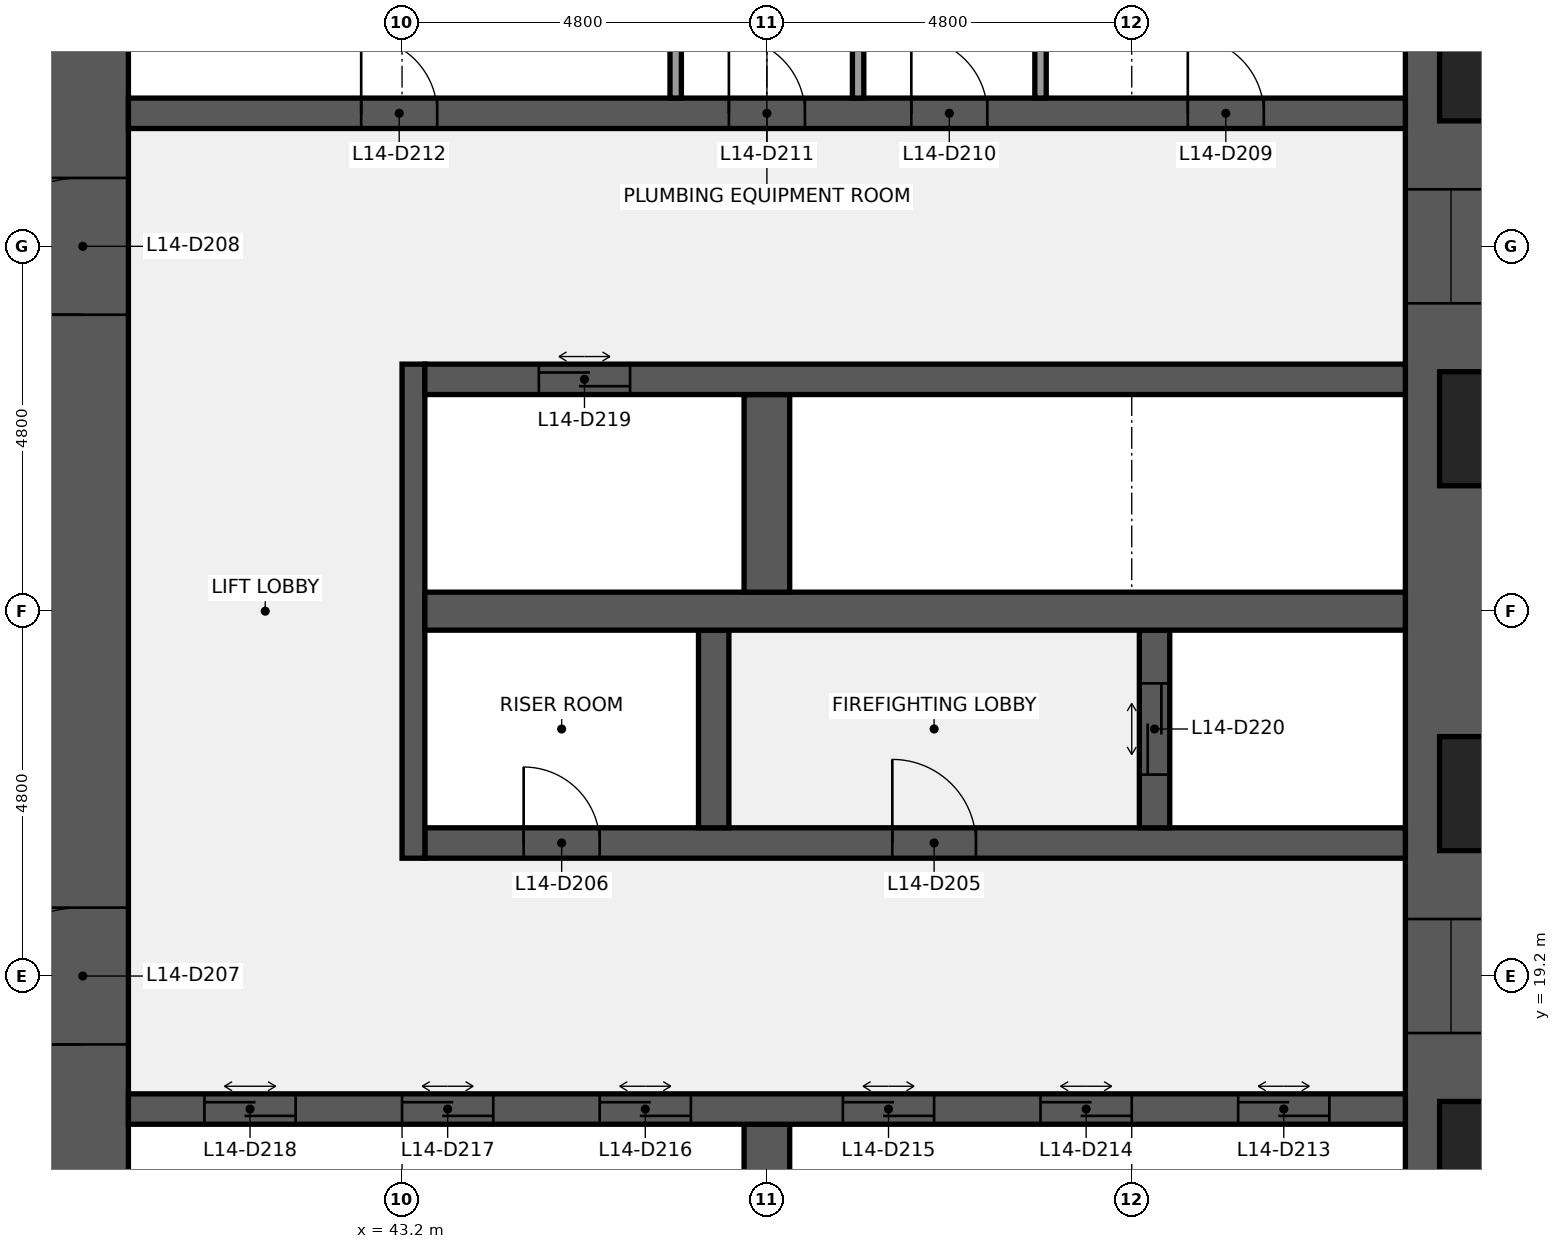
"""IFC4 building model, lengths in metres.
Left out: names, types, materials, properties, quantities, classifications, styles, units other than length and angle.
Written with IfcOpenShell. Run it as: python <this file> out.ifc"""

import sys

from ifc_helpers import new_model, si_unit, direction, frame, frame_2d, origin, place, context, subcontext, project, spatial, rectangle, extrude, element, fill, save


model = new_model("IFC4")
c1 = context("Model", 3, precision=1e-05, world=origin(), true_north=direction((0.0, 1.0)))
c2 = subcontext(c1, "Body", "Model", "MODEL_VIEW")
j1 = project(units=[si_unit("LENGTHUNIT", "METRE"), si_unit("PLANEANGLEUNIT", "RADIAN")], contexts=[c1])
p1 = place(None, origin())
s1 = spatial("IfcSite", under=j1, at=p1, CompositionType="ELEMENT")
p2 = place(p1, origin())
s2 = spatial("IfcBuilding", under=s1, at=p2, CompositionType="ELEMENT")
p3 = place(p2, frame((0.0, 0.0, 67.0)))
s3 = spatial("IfcBuildingStorey", under=s2, at=p3, CompositionType="ELEMENT", Elevation=67.0)
p4 = place(p3, frame((57.0, 38.4, 0.0), z_axis=(0.0, 0.0, 1.0), x_axis=(0.0, -1.0, 0.0)))
e1 = element("IfcWall", 1, at=p4, inside=s3, PredefinedType="SHEAR", context=c2, shape_type="SweptSolid", body=[
    extrude(rectangle(XDim=28.8, YDim=1.2, at=frame_2d((14.4, 0.0))), origin(), (0.0, 0.0, 1.0), 3.84),
])
p5 = place(p4, frame((18.45, 0.0, 0.9)))
e2 = element("IfcOpeningElement", 2, at=p5, cuts=e1, PredefinedType="OPENING", context=c2, shape_type="SweptSolid", body=[
    extrude(rectangle(XDim=1.5, YDim=1.5, at=frame_2d((0.75, 0.75))), frame((0.0, 0.61, 0.0), z_axis=(0.0, -1.0, 0.0), x_axis=(1.0, 0.0, 0.0)), (0.0, 0.0, 1.0), 1.22),
])
p6 = place(p4, frame((8.85, 0.0, 0.9)))
e3 = element("IfcOpeningElement", 3, at=p6, cuts=e1, PredefinedType="OPENING", context=c2, shape_type="SweptSolid", body=[
    extrude(rectangle(XDim=1.5, YDim=1.5, at=frame_2d((0.75, 0.75))), frame((0.0, 0.61, 0.0), z_axis=(0.0, -1.0, 0.0), x_axis=(1.0, 0.0, 0.0)), (0.0, 0.0, 1.0), 1.22),
])
p7 = place(p3, frame((39.0, 9.6, 0.0), z_axis=(0.0, 0.0, 1.0), x_axis=(0.0, 1.0, 0.0)))
e4 = element("IfcWall", 4, at=p7, inside=s3, PredefinedType="SHEAR", context=c2, shape_type="SweptSolid", body=[
    extrude(rectangle(XDim=28.8, YDim=1.2, at=frame_2d((14.4, 0.0))), origin(), (0.0, 0.0, 1.0), 3.84),
])
p8 = place(p7, frame((8.7, 0.0, 0.0)))
e5 = element("IfcOpeningElement", 5, at=p8, cuts=e4, PredefinedType="OPENING", context=c2, shape_type="SweptSolid", body=[
    extrude(rectangle(XDim=1.8, YDim=2.1, at=frame_2d((0.9, 1.05))), frame((0.0, 0.61, 0.0), z_axis=(0.0, -1.0, 0.0), x_axis=(1.0, 0.0, 0.0)), (0.0, 0.0, 1.0), 1.22),
])
p9 = place(p7, frame((18.3, 0.0, 0.0)))
e6 = element("IfcOpeningElement", 6, at=p9, cuts=e4, PredefinedType="OPENING", context=c2, shape_type="SweptSolid", body=[
    extrude(rectangle(XDim=1.8, YDim=2.1, at=frame_2d((0.9, 1.05))), frame((0.0, 0.61, 0.0), z_axis=(0.0, -1.0, 0.0), x_axis=(1.0, 0.0, 0.0)), (0.0, 0.0, 1.0), 1.22),
])
p10 = place(p3, frame((48.0, 14.65, 0.0), z_axis=(0.0, 0.0, 1.0), x_axis=(0.0, 1.0, 0.0)))
e7 = element("IfcWall", 7, at=p10, inside=s3, PredefinedType="SHEAR", context=c2, shape_type="SweptSolid", body=[
    extrude(rectangle(XDim=2.6, YDim=0.6, at=frame_2d((1.3, 0.0))), origin(), (0.0, 0.0, 1.0), 3.84),
])
p11 = place(p3, frame((39.6, 17.45, 0.0), z_axis=(0.0, 0.0, 1.0), x_axis=(1.0, 0.0, 0.0)))
e8 = element("IfcWall", 8, at=p11, inside=s3, PredefinedType="SHEAR", context=c2, shape_type="SweptSolid", body=[
    extrude(rectangle(XDim=16.8, YDim=0.4, at=frame_2d((8.4, 0.0))), origin(), (0.0, 0.0, 1.0), 3.84),
])
p12 = place(p11, frame((14.6, 0.0, 0.0)))
e9 = element("IfcOpeningElement", 9, at=p12, cuts=e8, PredefinedType="OPENING", context=c2, shape_type="SweptSolid", body=[
    extrude(rectangle(XDim=1.2, YDim=2.1, at=frame_2d((0.6, 1.05))), frame((0.0, 0.21, 0.0), z_axis=(0.0, -1.0, 0.0), x_axis=(1.0, 0.0, 0.0)), (0.0, 0.0, 1.0), 0.42),
])
p13 = place(p11, frame((12.0, 0.0, 0.0)))
e10 = element("IfcOpeningElement", 10, at=p13, cuts=e8, PredefinedType="OPENING", context=c2, shape_type="SweptSolid", body=[
    extrude(rectangle(XDim=1.2, YDim=2.1, at=frame_2d((0.6, 1.05))), frame((0.0, 0.21, 0.0), z_axis=(0.0, -1.0, 0.0), x_axis=(1.0, 0.0, 0.0)), (0.0, 0.0, 1.0), 0.42),
])
p14 = place(p11, frame((9.4, 0.0, 0.0)))
e11 = element("IfcOpeningElement", 11, at=p14, cuts=e8, PredefinedType="OPENING", context=c2, shape_type="SweptSolid", body=[
    extrude(rectangle(XDim=1.2, YDim=2.1, at=frame_2d((0.6, 1.05))), frame((0.0, 0.21, 0.0), z_axis=(0.0, -1.0, 0.0), x_axis=(1.0, 0.0, 0.0)), (0.0, 0.0, 1.0), 0.42),
])
p15 = place(p11, frame((6.2, 0.0, 0.0)))
e12 = element("IfcOpeningElement", 12, at=p15, cuts=e8, PredefinedType="OPENING", context=c2, shape_type="SweptSolid", body=[
    extrude(rectangle(XDim=1.2, YDim=2.1, at=frame_2d((0.6, 1.05))), frame((0.0, 0.21, 0.0), z_axis=(0.0, -1.0, 0.0), x_axis=(1.0, 0.0, 0.0)), (0.0, 0.0, 1.0), 0.42),
])
p16 = place(p11, frame((3.6, 0.0, 0.0)))
e13 = element("IfcOpeningElement", 13, at=p16, cuts=e8, PredefinedType="OPENING", context=c2, shape_type="SweptSolid", body=[
    extrude(rectangle(XDim=1.2, YDim=2.1, at=frame_2d((0.6, 1.05))), frame((0.0, 0.21, 0.0), z_axis=(0.0, -1.0, 0.0), x_axis=(1.0, 0.0, 0.0)), (0.0, 0.0, 1.0), 0.42),
])
p17 = place(p11, frame((1.0, 0.0, 0.0)))
e14 = element("IfcOpeningElement", 14, at=p17, cuts=e8, PredefinedType="OPENING", context=c2, shape_type="SweptSolid", body=[
    extrude(rectangle(XDim=1.2, YDim=2.1, at=frame_2d((0.6, 1.05))), frame((0.0, 0.21, 0.0), z_axis=(0.0, -1.0, 0.0), x_axis=(1.0, 0.0, 0.0)), (0.0, 0.0, 1.0), 0.42),
])
p18 = place(p3, frame((43.5, 20.95, 0.0), z_axis=(0.0, 0.0, 1.0), x_axis=(1.0, 0.0, 0.0)))
e15 = element("IfcWall", 15, at=p18, inside=s3, PredefinedType="SHEAR", context=c2, shape_type="SweptSolid", body=[
    extrude(rectangle(XDim=12.9, YDim=0.4, at=frame_2d((6.45, 0.0))), origin(), (0.0, 0.0, 1.0), 3.84),
])
p19 = place(p18, frame((6.15, 0.0, 0.0)))
e16 = element("IfcOpeningElement", 16, at=p19, cuts=e15, PredefinedType="OPENING", context=c2, shape_type="SweptSolid", body=[
    extrude(rectangle(XDim=1.1, YDim=2.1, at=frame_2d((0.55, 1.05))), frame((0.0, 0.21, 0.0), z_axis=(0.0, -1.0, 0.0), x_axis=(1.0, 0.0, 0.0)), (0.0, 0.0, 1.0), 0.42),
])
p20 = place(p18, frame((1.3, 0.0, 0.0)))
e17 = element("IfcOpeningElement", 17, at=p20, cuts=e15, PredefinedType="OPENING", context=c2, shape_type="SweptSolid", body=[
    extrude(rectangle(XDim=1.0, YDim=2.1, at=frame_2d((0.5, 1.05))), frame((0.0, 0.21, 0.0), z_axis=(0.0, -1.0, 0.0), x_axis=(1.0, 0.0, 0.0)), (0.0, 0.0, 1.0), 0.42),
])
p21 = place(p3, frame((43.35, 20.75, 0.0), z_axis=(0.0, 0.0, 1.0), x_axis=(0.0, 1.0, 0.0)))
e18 = element("IfcWall", 18, at=p21, inside=s3, PredefinedType="SHEAR", context=c2, shape_type="SweptSolid", body=[
    extrude(rectangle(XDim=6.5, YDim=0.3, at=frame_2d((3.25, 0.0))), origin(), (0.0, 0.0, 1.0), 3.84),
])
p22 = place(p3, frame((53.1, 21.15, 0.0), z_axis=(0.0, 0.0, 1.0), x_axis=(0.0, 1.0, 0.0)))
e19 = element("IfcWall", 19, at=p22, inside=s3, PredefinedType="SHEAR", context=c2, shape_type="SweptSolid", body=[
    extrude(rectangle(XDim=2.6, YDim=0.4, at=frame_2d((1.3, 0.0))), origin(), (0.0, 0.0, 1.0), 3.84),
])
p23 = place(p22, frame((0.7, 0.0, 0.0)))
e20 = element("IfcOpeningElement", 20, at=p23, cuts=e19, PredefinedType="OPENING", context=c2, shape_type="SweptSolid", body=[
    extrude(rectangle(XDim=1.2, YDim=2.1, at=frame_2d((0.6, 1.05))), frame((0.0, 0.21, 0.0), z_axis=(0.0, -1.0, 0.0), x_axis=(1.0, 0.0, 0.0)), (0.0, 0.0, 1.0), 0.42),
])
p24 = place(p3, frame((47.3, 21.15, 0.0), z_axis=(0.0, 0.0, 1.0), x_axis=(0.0, 1.0, 0.0)))
e21 = element("IfcWall", 21, at=p24, inside=s3, PredefinedType="SHEAR", context=c2, shape_type="SweptSolid", body=[
    extrude(rectangle(XDim=2.6, YDim=0.4, at=frame_2d((1.3, 0.0))), origin(), (0.0, 0.0, 1.0), 3.84),
])
p25 = place(p3, frame((43.5, 24.0, 0.0), z_axis=(0.0, 0.0, 1.0), x_axis=(1.0, 0.0, 0.0)))
e22 = element("IfcWall", 22, at=p25, inside=s3, PredefinedType="SHEAR", context=c2, shape_type="SweptSolid", body=[
    extrude(rectangle(XDim=12.9, YDim=0.5, at=frame_2d((6.45, 0.0))), origin(), (0.0, 0.0, 1.0), 3.84),
])
p26 = place(p3, frame((48.0, 24.25, 0.0), z_axis=(0.0, 0.0, 1.0), x_axis=(0.0, 1.0, 0.0)))
e23 = element("IfcWall", 23, at=p26, inside=s3, PredefinedType="SHEAR", context=c2, shape_type="SweptSolid", body=[
    extrude(rectangle(XDim=2.6, YDim=0.6, at=frame_2d((1.3, 0.0))), origin(), (0.0, 0.0, 1.0), 3.84),
])
p27 = place(p3, frame((43.5, 27.05, 0.0), z_axis=(0.0, 0.0, 1.0), x_axis=(1.0, 0.0, 0.0)))
e24 = element("IfcWall", 24, at=p27, inside=s3, PredefinedType="SHEAR", context=c2, shape_type="SweptSolid", body=[
    extrude(rectangle(XDim=12.9, YDim=0.4, at=frame_2d((6.45, 0.0))), origin(), (0.0, 0.0, 1.0), 3.84),
])
p28 = place(p27, frame((1.5, 0.0, 0.0)))
e25 = element("IfcOpeningElement", 25, at=p28, cuts=e24, PredefinedType="OPENING", context=c2, shape_type="SweptSolid", body=[
    extrude(rectangle(XDim=1.2, YDim=2.1, at=frame_2d((0.6, 1.05))), frame((0.0, 0.21, 0.0), z_axis=(0.0, -1.0, 0.0), x_axis=(1.0, 0.0, 0.0)), (0.0, 0.0, 1.0), 0.42),
])
p29 = place(p3, frame((39.6, 30.55, 0.0), z_axis=(0.0, 0.0, 1.0), x_axis=(1.0, 0.0, 0.0)))
e26 = element("IfcWall", 26, at=p29, inside=s3, PredefinedType="SHEAR", context=c2, shape_type="SweptSolid", body=[
    extrude(rectangle(XDim=16.8, YDim=0.4, at=frame_2d((8.4, 0.0))), origin(), (0.0, 0.0, 1.0), 3.84),
])
p30 = place(p29, frame((13.938, 0.0, 0.0)))
e27 = element("IfcOpeningElement", 27, at=p30, cuts=e26, PredefinedType="OPENING", context=c2, shape_type="SweptSolid", body=[
    extrude(rectangle(XDim=1.0, YDim=2.1, at=frame_2d((0.5, 1.05))), frame((0.0, 0.21, 0.0), z_axis=(0.0, -1.0, 0.0), x_axis=(1.0, 0.0, 0.0)), (0.0, 0.0, 1.0), 0.42),
])
p31 = place(p29, frame((10.3, 0.0, 0.0)))
e28 = element("IfcOpeningElement", 28, at=p31, cuts=e26, PredefinedType="OPENING", context=c2, shape_type="SweptSolid", body=[
    extrude(rectangle(XDim=1.0, YDim=2.1, at=frame_2d((0.5, 1.05))), frame((0.0, 0.21, 0.0), z_axis=(0.0, -1.0, 0.0), x_axis=(1.0, 0.0, 0.0)), (0.0, 0.0, 1.0), 0.42),
])
p32 = place(p29, frame((7.9, 0.0, 0.0)))
e29 = element("IfcOpeningElement", 29, at=p32, cuts=e26, PredefinedType="OPENING", context=c2, shape_type="SweptSolid", body=[
    extrude(rectangle(XDim=1.0, YDim=2.1, at=frame_2d((0.5, 1.05))), frame((0.0, 0.21, 0.0), z_axis=(0.0, -1.0, 0.0), x_axis=(1.0, 0.0, 0.0)), (0.0, 0.0, 1.0), 0.42),
])
p33 = place(p29, frame((3.062, 0.0, 0.0)))
e30 = element("IfcOpeningElement", 30, at=p33, cuts=e26, PredefinedType="OPENING", context=c2, shape_type="SweptSolid", body=[
    extrude(rectangle(XDim=1.0, YDim=2.1, at=frame_2d((0.5, 1.05))), frame((0.0, 0.21, 0.0), z_axis=(0.0, -1.0, 0.0), x_axis=(1.0, 0.0, 0.0)), (0.0, 0.0, 1.0), 0.42),
])
for number, where, z_axis, x_axis in (
    (31, (51.6, 30.75, 0.0), (0.0, 0.0, 1.0), (0.0, 1.0, 0.0)),
    (32, (49.2, 30.75, 0.0), (0.0, 0.0, 1.0), (0.0, 1.0, 0.0)),
    (33, (46.8, 30.75, 0.0), (0.0, 0.0, 1.0), (0.0, 1.0, 0.0)),
):
    element("IfcWall", number, at=place(p3, frame(where, z_axis=z_axis, x_axis=x_axis)), inside=s3, PredefinedType="PARTITIONING", context=c2, shape_type="SweptSolid", body=[
        extrude(rectangle(XDim=2.6, YDim=0.15, at=frame_2d((1.3, 0.0))), origin(), (0.0, 0.0, 1.0), 3.84),
    ])
p34 = place(p19, origin())
e34 = element("IfcDoor", 34, at=p34, inside=s3, OperationType="SINGLE_SWING_LEFT", PredefinedType="DOOR", context=c2, shape_type="SweptSolid", body=[
    extrude(rectangle(XDim=1.1, YDim=2.1, at=frame_2d((0.55, 1.05))), frame((0.0, 0.025, 0.0), z_axis=(0.0, -1.0, 0.0), x_axis=(1.0, 0.0, 0.0)), (0.0, 0.0, 1.0), 0.05),
])
fill(e16, e34)
p35 = place(p20, origin())
e35 = element("IfcDoor", 35, at=p35, inside=s3, OperationType="SINGLE_SWING_LEFT", PredefinedType="DOOR", context=c2, shape_type="SweptSolid", body=[
    extrude(rectangle(XDim=1.0, YDim=2.1, at=frame_2d((0.5, 1.05))), frame((0.0, 0.025, 0.0), z_axis=(0.0, -1.0, 0.0), x_axis=(1.0, 0.0, 0.0)), (0.0, 0.0, 1.0), 0.05),
])
fill(e17, e35)
p36 = place(p8, origin())
e36 = element("IfcDoor", 36, at=p36, inside=s3, OperationType="DOUBLE_DOOR_SINGLE_SWING", PredefinedType="DOOR", context=c2, shape_type="SweptSolid", body=[
    extrude(rectangle(XDim=1.8, YDim=2.1, at=frame_2d((0.9, 1.05))), frame((0.0, 0.025, 0.0), z_axis=(0.0, -1.0, 0.0), x_axis=(1.0, 0.0, 0.0)), (0.0, 0.0, 1.0), 0.05),
])
fill(e5, e36)
p37 = place(p9, origin())
e37 = element("IfcDoor", 37, at=p37, inside=s3, OperationType="DOUBLE_DOOR_SINGLE_SWING", PredefinedType="DOOR", context=c2, shape_type="SweptSolid", body=[
    extrude(rectangle(XDim=1.8, YDim=2.1, at=frame_2d((0.9, 1.05))), frame((0.0, 0.025, 0.0), z_axis=(0.0, -1.0, 0.0), x_axis=(1.0, 0.0, 0.0)), (0.0, 0.0, 1.0), 0.05),
])
fill(e6, e37)
p38 = place(p30, origin())
e38 = element("IfcDoor", 38, at=p38, inside=s3, OperationType="SINGLE_SWING_LEFT", PredefinedType="DOOR", context=c2, shape_type="SweptSolid", body=[
    extrude(rectangle(XDim=1.0, YDim=2.1, at=frame_2d((0.5, 1.05))), frame((0.0, 0.025, 0.0), z_axis=(0.0, -1.0, 0.0), x_axis=(1.0, 0.0, 0.0)), (0.0, 0.0, 1.0), 0.05),
])
fill(e27, e38)
p39 = place(p31, origin())
e39 = element("IfcDoor", 39, at=p39, inside=s3, OperationType="SINGLE_SWING_LEFT", PredefinedType="DOOR", context=c2, shape_type="SweptSolid", body=[
    extrude(rectangle(XDim=1.0, YDim=2.1, at=frame_2d((0.5, 1.05))), frame((0.0, 0.025, 0.0), z_axis=(0.0, -1.0, 0.0), x_axis=(1.0, 0.0, 0.0)), (0.0, 0.0, 1.0), 0.05),
])
fill(e28, e39)
p40 = place(p32, origin())
e40 = element("IfcDoor", 40, at=p40, inside=s3, OperationType="SINGLE_SWING_LEFT", PredefinedType="DOOR", context=c2, shape_type="SweptSolid", body=[
    extrude(rectangle(XDim=1.0, YDim=2.1, at=frame_2d((0.5, 1.05))), frame((0.0, 0.025, 0.0), z_axis=(0.0, -1.0, 0.0), x_axis=(1.0, 0.0, 0.0)), (0.0, 0.0, 1.0), 0.05),
])
fill(e29, e40)
p41 = place(p33, origin())
e41 = element("IfcDoor", 41, at=p41, inside=s3, OperationType="SINGLE_SWING_LEFT", PredefinedType="DOOR", context=c2, shape_type="SweptSolid", body=[
    extrude(rectangle(XDim=1.0, YDim=2.1, at=frame_2d((0.5, 1.05))), frame((0.0, 0.025, 0.0), z_axis=(0.0, -1.0, 0.0), x_axis=(1.0, 0.0, 0.0)), (0.0, 0.0, 1.0), 0.05),
])
fill(e30, e41)
p42 = place(p12, origin())
e42 = element("IfcDoor", 42, at=p42, inside=s3, OperationType="DOUBLE_DOOR_SLIDING", PredefinedType="DOOR", context=c2, shape_type="SweptSolid", body=[
    extrude(rectangle(XDim=1.2, YDim=2.1, at=frame_2d((0.6, 1.05))), frame((0.0, 0.025, 0.0), z_axis=(0.0, -1.0, 0.0), x_axis=(1.0, 0.0, 0.0)), (0.0, 0.0, 1.0), 0.05),
])
fill(e9, e42)
p43 = place(p13, origin())
e43 = element("IfcDoor", 43, at=p43, inside=s3, OperationType="DOUBLE_DOOR_SLIDING", PredefinedType="DOOR", context=c2, shape_type="SweptSolid", body=[
    extrude(rectangle(XDim=1.2, YDim=2.1, at=frame_2d((0.6, 1.05))), frame((0.0, 0.025, 0.0), z_axis=(0.0, -1.0, 0.0), x_axis=(1.0, 0.0, 0.0)), (0.0, 0.0, 1.0), 0.05),
])
fill(e10, e43)
p44 = place(p14, origin())
e44 = element("IfcDoor", 44, at=p44, inside=s3, OperationType="DOUBLE_DOOR_SLIDING", PredefinedType="DOOR", context=c2, shape_type="SweptSolid", body=[
    extrude(rectangle(XDim=1.2, YDim=2.1, at=frame_2d((0.6, 1.05))), frame((0.0, 0.025, 0.0), z_axis=(0.0, -1.0, 0.0), x_axis=(1.0, 0.0, 0.0)), (0.0, 0.0, 1.0), 0.05),
])
fill(e11, e44)
p45 = place(p15, origin())
e45 = element("IfcDoor", 45, at=p45, inside=s3, OperationType="DOUBLE_DOOR_SLIDING", PredefinedType="DOOR", context=c2, shape_type="SweptSolid", body=[
    extrude(rectangle(XDim=1.2, YDim=2.1, at=frame_2d((0.6, 1.05))), frame((0.0, 0.025, 0.0), z_axis=(0.0, -1.0, 0.0), x_axis=(1.0, 0.0, 0.0)), (0.0, 0.0, 1.0), 0.05),
])
fill(e12, e45)
p46 = place(p16, origin())
e46 = element("IfcDoor", 46, at=p46, inside=s3, OperationType="DOUBLE_DOOR_SLIDING", PredefinedType="DOOR", context=c2, shape_type="SweptSolid", body=[
    extrude(rectangle(XDim=1.2, YDim=2.1, at=frame_2d((0.6, 1.05))), frame((0.0, 0.025, 0.0), z_axis=(0.0, -1.0, 0.0), x_axis=(1.0, 0.0, 0.0)), (0.0, 0.0, 1.0), 0.05),
])
fill(e13, e46)
p47 = place(p17, origin())
e47 = element("IfcDoor", 47, at=p47, inside=s3, OperationType="DOUBLE_DOOR_SLIDING", PredefinedType="DOOR", context=c2, shape_type="SweptSolid", body=[
    extrude(rectangle(XDim=1.2, YDim=2.1, at=frame_2d((0.6, 1.05))), frame((0.0, 0.025, 0.0), z_axis=(0.0, -1.0, 0.0), x_axis=(1.0, 0.0, 0.0)), (0.0, 0.0, 1.0), 0.05),
])
fill(e14, e47)
p48 = place(p28, origin())
e48 = element("IfcDoor", 48, at=p48, inside=s3, OperationType="DOUBLE_DOOR_SLIDING", PredefinedType="DOOR", context=c2, shape_type="SweptSolid", body=[
    extrude(rectangle(XDim=1.2, YDim=2.1, at=frame_2d((0.6, 1.05))), frame((0.0, 0.025, 0.0), z_axis=(0.0, -1.0, 0.0), x_axis=(1.0, 0.0, 0.0)), (0.0, 0.0, 1.0), 0.05),
])
fill(e25, e48)
p49 = place(p23, origin())
e49 = element("IfcDoor", 49, at=p49, inside=s3, OperationType="DOUBLE_DOOR_SLIDING", PredefinedType="DOOR", context=c2, shape_type="SweptSolid", body=[
    extrude(rectangle(XDim=1.2, YDim=2.1, at=frame_2d((0.6, 1.05))), frame((0.0, 0.025, 0.0), z_axis=(0.0, -1.0, 0.0), x_axis=(1.0, 0.0, 0.0)), (0.0, 0.0, 1.0), 0.05),
])
fill(e20, e49)
p50 = place(p5, origin())
e50 = element("IfcWindow", 50, at=p50, inside=s3, PartitioningType="SINGLE_PANEL", PredefinedType="WINDOW", context=c2, shape_type="SweptSolid", body=[
    extrude(rectangle(XDim=1.5, YDim=1.5, at=frame_2d((0.75, 0.75))), frame((0.0, 0.03, 0.0), z_axis=(0.0, -1.0, 0.0), x_axis=(1.0, 0.0, 0.0)), (0.0, 0.0, 1.0), 0.06),
])
fill(e2, e50)
p51 = place(p6, origin())
e51 = element("IfcWindow", 51, at=p51, inside=s3, PartitioningType="SINGLE_PANEL", PredefinedType="WINDOW", context=c2, shape_type="SweptSolid", body=[
    extrude(rectangle(XDim=1.5, YDim=1.5, at=frame_2d((0.75, 0.75))), frame((0.0, 0.03, 0.0), z_axis=(0.0, -1.0, 0.0), x_axis=(1.0, 0.0, 0.0)), (0.0, 0.0, 1.0), 0.06),
])
fill(e3, e51)
save(model, sys.argv[1])
